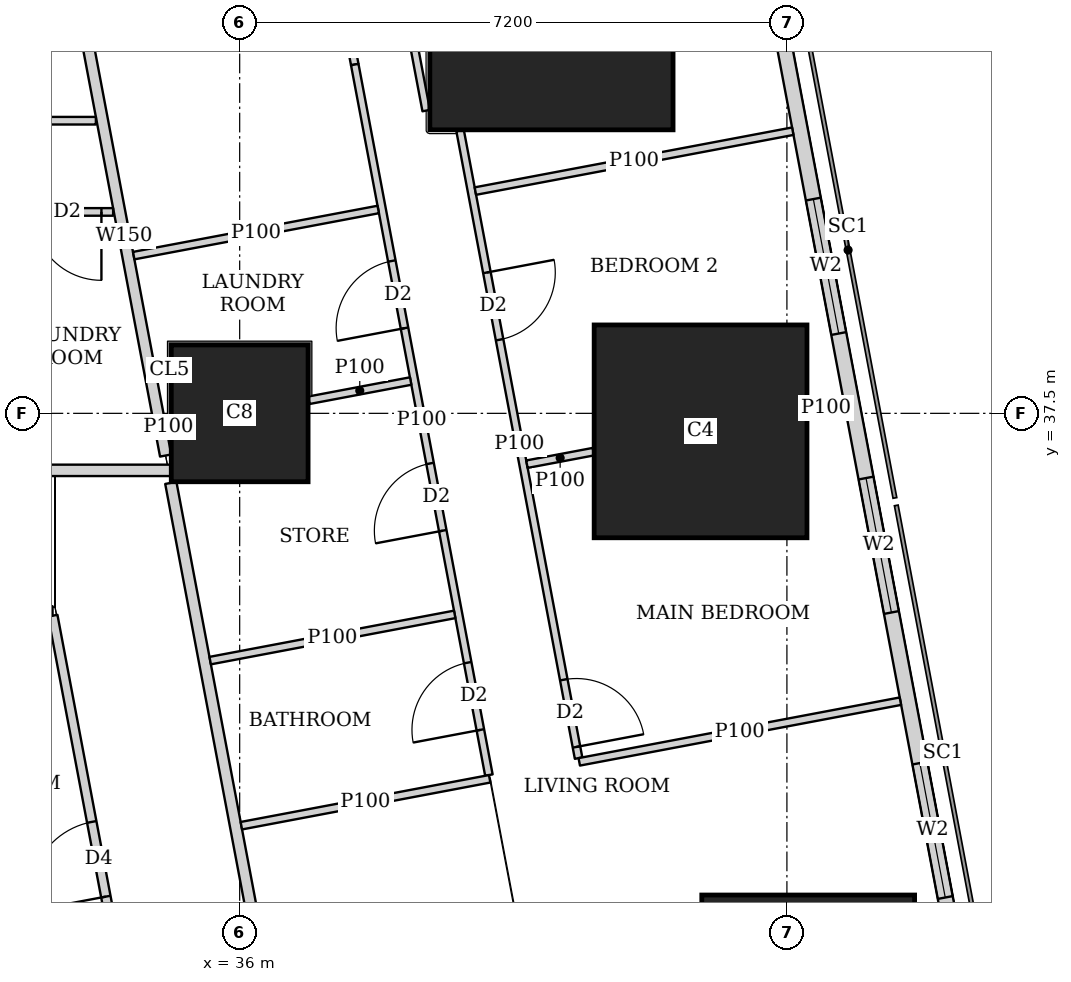
"""IFC4 building model, lengths in metres.
Left out: names, types, materials, properties, quantities, classifications, styles, units other than length and angle.
Written with IfcOpenShell. Run it as: python <this file> out.ifc"""

import sys

from ifc_helpers import new_model, si_unit, direction, frame, frame_2d, origin, origin_2d, place, context, subcontext, project, spatial, rectangle, extrude, element, fill, save


model = new_model("IFC4")
c1 = context("Model", 3, precision=1e-05, world=origin(), true_north=direction((0.0, 1.0)))
c2 = subcontext(c1, "Body", "Model", "MODEL_VIEW")
j1 = project(units=[si_unit("LENGTHUNIT", "METRE"), si_unit("PLANEANGLEUNIT", "RADIAN")], contexts=[c1])
p1 = place(None, origin())
s1 = spatial("IfcSite", under=j1, at=p1, CompositionType="ELEMENT")
p2 = place(p1, origin())
s2 = spatial("IfcBuilding", under=s1, at=p2, CompositionType="ELEMENT")
p3 = place(p2, frame((0.0, 0.0, 31.25)))
s3 = spatial("IfcBuildingStorey", under=s2, at=p3, CompositionType="ELEMENT", Elevation=31.25)
p4 = place(p3, frame((43.48, 29.763, 0.0), z_axis=(0.0, 0.0, 1.0), x_axis=(1.0, 0.0, 0.0)))
e1 = element("IfcColumn", 1, at=p4, inside=s3, PredefinedType="COLUMN", context=c2, shape_type="SweptSolid", body=[
    extrude(rectangle(XDim=2.8, YDim=2.8, at=origin_2d()), origin(), (0.0, 0.0, 1.0), 3.75),
])
p5 = place(p3, frame((36.0, 37.5, 0.0), z_axis=(0.0, 0.0, 1.0), x_axis=(1.0, 0.0, 0.0)))
e2 = element("IfcColumn", 2, at=p5, inside=s3, PredefinedType="COLUMN", context=c2, shape_type="SweptSolid", body=[
    extrude(rectangle(XDim=1.8, YDim=1.8, at=origin_2d()), origin(), (0.0, 0.0, 1.0), 3.75),
])
p6 = place(p3, frame((42.064, 37.263, 0.0), z_axis=(0.0, 0.0, 1.0), x_axis=(1.0, 0.0, 0.0)))
e3 = element("IfcColumn", 3, at=p6, inside=s3, PredefinedType="COLUMN", context=c2, shape_type="SweptSolid", body=[
    extrude(rectangle(XDim=2.8, YDim=2.8, at=origin_2d()), origin(), (0.0, 0.0, 1.0), 3.75),
])
p7 = place(p3, frame((40.102, 42.83, 0.0), z_axis=(0.0, 0.0, 1.0), x_axis=(1.0, 0.0, 0.0)))
e4 = element("IfcColumn", 4, at=p7, inside=s3, PredefinedType="COLUMN", context=c2, shape_type="SweptSolid", body=[
    extrude(rectangle(XDim=3.2, YDim=3.2, at=origin_2d()), origin(), (0.0, 0.0, 1.0), 3.75),
])
p8 = place(p3, frame((50.653, 2.703, 0.0), z_axis=(0.0, 0.0, 1.0), x_axis=(-0.185612026696, 0.982623109613, 0.0)))
e5 = element("IfcWall", 5, at=p8, inside=s3, PredefinedType="SOLIDWALL", context=c2, shape_type="SweptSolid", body=[
    extrude(rectangle(XDim=41.393, YDim=0.2, at=frame_2d((20.697, 0.0))), origin(), (0.0, 0.0, 1.0), 3.5),
])
p9 = place(p8, frame((1.633, 0.0, 0.9)))
e6 = element("IfcOpeningElement", 6, at=p9, cuts=e5, PredefinedType="OPENING", context=c2, shape_type="SweptSolid", body=[
    extrude(rectangle(XDim=1.8, YDim=1.5, at=frame_2d((0.9, 0.75))), frame((0.0, 0.11, 0.0), z_axis=(0.0, -1.0, 0.0), x_axis=(1.0, 0.0, 0.0)), (0.0, 0.0, 1.0), 0.22),
])
p10 = place(p8, frame((6.032, 0.0, 0.9)))
e7 = element("IfcOpeningElement", 7, at=p10, cuts=e5, PredefinedType="OPENING", context=c2, shape_type="SweptSolid", body=[
    extrude(rectangle(XDim=1.8, YDim=1.5, at=frame_2d((0.9, 0.75))), frame((0.0, 0.11, 0.0), z_axis=(0.0, -1.0, 0.0), x_axis=(1.0, 0.0, 0.0)), (0.0, 0.0, 1.0), 0.22),
])
p11 = place(p8, frame((9.848, 0.0, 0.9)))
e8 = element("IfcOpeningElement", 8, at=p11, cuts=e5, PredefinedType="OPENING", context=c2, shape_type="SweptSolid", body=[
    extrude(rectangle(XDim=1.8, YDim=1.5, at=frame_2d((0.9, 0.75))), frame((0.0, 0.11, 0.0), z_axis=(0.0, -1.0, 0.0), x_axis=(1.0, 0.0, 0.0)), (0.0, 0.0, 1.0), 0.22),
])
p12 = place(p8, frame((17.481, 0.0, 0.9)))
e9 = element("IfcOpeningElement", 9, at=p12, cuts=e5, PredefinedType="OPENING", context=c2, shape_type="SweptSolid", body=[
    extrude(rectangle(XDim=1.8, YDim=1.5, at=frame_2d((0.9, 0.75))), frame((0.0, 0.11, 0.0), z_axis=(0.0, -1.0, 0.0), x_axis=(1.0, 0.0, 0.0)), (0.0, 0.0, 1.0), 0.22),
])
p13 = place(p8, frame((21.297, 0.0, 0.9)))
e10 = element("IfcOpeningElement", 10, at=p13, cuts=e5, PredefinedType="OPENING", context=c2, shape_type="SweptSolid", body=[
    extrude(rectangle(XDim=1.8, YDim=1.5, at=frame_2d((0.9, 0.75))), frame((0.0, 0.11, 0.0), z_axis=(0.0, -1.0, 0.0), x_axis=(1.0, 0.0, 0.0)), (0.0, 0.0, 1.0), 0.22),
])
p14 = place(p8, frame((25.113, 0.0, 0.9)))
e11 = element("IfcOpeningElement", 11, at=p14, cuts=e5, PredefinedType="OPENING", context=c2, shape_type="SweptSolid", body=[
    extrude(rectangle(XDim=1.8, YDim=1.5, at=frame_2d((0.9, 0.75))), frame((0.0, 0.11, 0.0), z_axis=(0.0, -1.0, 0.0), x_axis=(1.0, 0.0, 0.0)), (0.0, 0.0, 1.0), 0.22),
])
p15 = place(p8, frame((28.93, 0.0, 0.9)))
e12 = element("IfcOpeningElement", 12, at=p15, cuts=e5, PredefinedType="OPENING", context=c2, shape_type="SweptSolid", body=[
    extrude(rectangle(XDim=1.8, YDim=1.5, at=frame_2d((0.9, 0.75))), frame((0.0, 0.11, 0.0), z_axis=(0.0, -1.0, 0.0), x_axis=(1.0, 0.0, 0.0)), (0.0, 0.0, 1.0), 0.22),
])
p16 = place(p8, frame((32.746, 0.0, 0.9)))
e13 = element("IfcOpeningElement", 13, at=p16, cuts=e5, PredefinedType="OPENING", context=c2, shape_type="SweptSolid", body=[
    extrude(rectangle(XDim=1.8, YDim=1.5, at=frame_2d((0.9, 0.75))), frame((0.0, 0.11, 0.0), z_axis=(0.0, -1.0, 0.0), x_axis=(1.0, 0.0, 0.0)), (0.0, 0.0, 1.0), 0.22),
])
p17 = place(p8, frame((36.481, 0.0, 0.9)))
e14 = element("IfcOpeningElement", 14, at=p17, cuts=e5, PredefinedType="OPENING", context=c2, shape_type="SweptSolid", body=[
    extrude(rectangle(XDim=1.8, YDim=1.5, at=frame_2d((0.9, 0.75))), frame((0.0, 0.11, 0.0), z_axis=(0.0, -1.0, 0.0), x_axis=(1.0, 0.0, 0.0)), (0.0, 0.0, 1.0), 0.22),
])
p18 = place(p3, frame((29.701, 36.75, 0.0), z_axis=(0.0, 0.0, 1.0), x_axis=(1.0, 0.0, 0.0)))
e15 = element("IfcWall", 15, at=p18, inside=s3, PredefinedType="SOLIDWALL", context=c2, shape_type="SweptSolid", body=[
    extrude(rectangle(XDim=5.399, YDim=0.15, at=frame_2d((2.7, 0.0))), origin(), (0.0, 0.0, 1.0), 3.5),
])
p19 = place(p3, frame((33.933, 42.73, 0.0), z_axis=(0.0, 0.0, 1.0), x_axis=(0.185617897238, -0.982622000682, 0.0)))
e16 = element("IfcWall", 16, at=p19, inside=s3, PredefinedType="SOLIDWALL", context=c2, shape_type="SweptSolid", body=[
    extrude(rectangle(XDim=5.887, YDim=0.15, at=frame_2d((2.944, 0.0))), origin(), (0.0, 0.0, 1.0), 3.5),
])
p20 = place(p3, frame((35.094, 36.585, 0.0), z_axis=(0.0, 0.0, 1.0), x_axis=(0.185588860311, -0.982627485331, 0.0)))
e17 = element("IfcWall", 17, at=p20, inside=s3, PredefinedType="SOLIDWALL", context=c2, shape_type="SweptSolid", body=[
    extrude(rectangle(XDim=34.797, YDim=0.15, at=frame_2d((17.399, 0.0))), origin(), (0.0, 0.0, 1.0), 2.5),
])
p21 = place(p20, frame((6.012, 0.0, 0.0)))
e18 = element("IfcOpeningElement", 18, at=p21, cuts=e17, PredefinedType="OPENING", context=c2, shape_type="SweptSolid", body=[
    extrude(rectangle(XDim=1.0, YDim=2.1, at=frame_2d((0.5, 1.05))), frame((0.0, 0.085, 0.0), z_axis=(0.0, -1.0, 0.0), x_axis=(1.0, 0.0, 0.0)), (0.0, 0.0, 1.0), 0.17),
])
p22 = place(p20, frame((9.828, 0.0, 0.0)))
e19 = element("IfcOpeningElement", 19, at=p22, cuts=e17, PredefinedType="OPENING", context=c2, shape_type="SweptSolid", body=[
    extrude(rectangle(XDim=1.0, YDim=2.1, at=frame_2d((0.5, 1.05))), frame((0.0, 0.085, 0.0), z_axis=(0.0, -1.0, 0.0), x_axis=(1.0, 0.0, 0.0)), (0.0, 0.0, 1.0), 0.17),
])
p23 = place(p20, frame((25.9, 0.0, 0.0)))
e20 = element("IfcOpeningElement", 20, at=p23, cuts=e17, PredefinedType="OPENING", context=c2, shape_type="SweptSolid", body=[
    extrude(rectangle(XDim=1.0, YDim=2.1, at=frame_2d((0.5, 1.05))), frame((0.0, 0.085, 0.0), z_axis=(0.0, -1.0, 0.0), x_axis=(1.0, 0.0, 0.0)), (0.0, 0.0, 1.0), 0.17),
])
p24 = place(p3, frame((38.454, 41.483, 0.0), z_axis=(0.0, 0.0, 1.0), x_axis=(-0.185609245326, 0.982623634994, 0.0)))
e21 = element("IfcWall", 21, at=p24, inside=s3, PredefinedType="PARTITIONING", context=c2, shape_type="SweptSolid", body=[
    extrude(rectangle(XDim=4.241, YDim=0.1, at=frame_2d((2.12, 0.0))), origin(), (0.0, 0.0, 1.0), 2.05),
])
p25 = place(p3, frame((38.9, 41.22, 0.0), z_axis=(0.0, 0.0, 1.0), x_axis=(0.18556562412, -0.982631873666, 0.0)))
e22 = element("IfcWall", 22, at=p25, inside=s3, PredefinedType="PARTITIONING", context=c2, shape_type="SweptSolid", body=[
    extrude(rectangle(XDim=8.402, YDim=0.1, at=frame_2d((4.201, 0.0))), origin(), (0.0, 0.0, 1.0), 3.5),
])
p26 = place(p25, frame((7.352, 0.0, 0.0)))
e23 = element("IfcOpeningElement", 23, at=p26, cuts=e22, PredefinedType="OPENING", context=c2, shape_type="SweptSolid", body=[
    extrude(rectangle(XDim=0.9, YDim=2.1, at=frame_2d((0.45, 1.05))), frame((0.0, 0.06, 0.0), z_axis=(0.0, -1.0, 0.0), x_axis=(1.0, 0.0, 0.0)), (0.0, 0.0, 1.0), 0.12),
])
p27 = place(p25, frame((1.9, 0.0, 0.0)))
e24 = element("IfcOpeningElement", 24, at=p27, cuts=e22, PredefinedType="OPENING", context=c2, shape_type="SweptSolid", body=[
    extrude(rectangle(XDim=0.9, YDim=2.1, at=frame_2d((0.45, 1.05))), frame((0.0, 0.06, 0.0), z_axis=(0.0, -1.0, 0.0), x_axis=(1.0, 0.0, 0.0)), (0.0, 0.0, 1.0), 0.12),
])
p28 = place(p3, frame((37.417, 42.602, 0.0), z_axis=(0.0, 0.0, 1.0), x_axis=(0.185672001976, -0.982611778721, 0.0)))
e25 = element("IfcWall", 25, at=p28, inside=s3, PredefinedType="PARTITIONING", context=c2, shape_type="SweptSolid", body=[
    extrude(rectangle(XDim=0.522, YDim=0.1, at=frame_2d((0.261, 0.0))), origin(), (0.0, 0.0, 1.0), 2.05),
])
p29 = place(p3, frame((37.514, 42.089, 0.0), z_axis=(0.0, 0.0, 1.0), x_axis=(0.185543450498, -0.982636060796, 0.0)))
e26 = element("IfcWall", 26, at=p29, inside=s3, PredefinedType="PARTITIONING", context=c2, shape_type="SweptSolid", body=[
    extrude(rectangle(XDim=9.513, YDim=0.1, at=frame_2d((4.757, 0.0))), origin(), (0.0, 0.0, 1.0), 3.5),
])
p30 = place(p29, frame((8.008, 0.0, 0.0)))
e27 = element("IfcOpeningElement", 27, at=p30, cuts=e26, PredefinedType="OPENING", context=c2, shape_type="SweptSolid", body=[
    extrude(rectangle(XDim=0.9, YDim=2.1, at=frame_2d((0.45, 1.05))), frame((0.0, 0.06, 0.0), z_axis=(0.0, -1.0, 0.0), x_axis=(1.0, 0.0, 0.0)), (0.0, 0.0, 1.0), 0.12),
])
p31 = place(p29, frame((2.63, 0.0, 0.0)))
e28 = element("IfcOpeningElement", 28, at=p31, cuts=e26, PredefinedType="OPENING", context=c2, shape_type="SweptSolid", body=[
    extrude(rectangle(XDim=0.9, YDim=2.1, at=frame_2d((0.45, 1.05))), frame((0.0, 0.06, 0.0), z_axis=(0.0, -1.0, 0.0), x_axis=(1.0, 0.0, 0.0)), (0.0, 0.0, 1.0), 0.12),
])
p32 = place(p29, frame((5.341, 0.0, 0.0)))
e29 = element("IfcOpeningElement", 29, at=p32, cuts=e26, PredefinedType="OPENING", context=c2, shape_type="SweptSolid", body=[
    extrude(rectangle(XDim=0.9, YDim=2.1, at=frame_2d((0.45, 1.05))), frame((0.0, 0.06, 0.0), z_axis=(0.0, -1.0, 0.0), x_axis=(1.0, 0.0, 0.0)), (0.0, 0.0, 1.0), 0.12),
])
p33 = place(p3, frame((43.277, 41.212, 0.0), z_axis=(0.0, 0.0, 1.0), x_axis=(-0.982665405803, -0.185387972203, 0.0)))
e30 = element("IfcWall", 30, at=p33, inside=s3, PredefinedType="PARTITIONING", context=c2, shape_type="SweptSolid", body=[
    extrude(rectangle(XDim=4.25, YDim=0.1, at=frame_2d((2.125, 0.0))), origin(), (0.0, 0.0, 1.0), 2.05),
])
p34 = place(p3, frame((43.955, 37.62, 0.0), z_axis=(0.0, 0.0, 1.0), x_axis=(-0.982543152073, -0.186034820164, 0.0)))
e31 = element("IfcWall", 31, at=p34, inside=s3, PredefinedType="PARTITIONING", context=c2, shape_type="SweptSolid", body=[
    extrude(rectangle(XDim=0.49, YDim=0.1, at=frame_2d((0.245, 0.0))), origin(), (0.0, 0.0, 1.0), 3.5),
])
p35 = place(p3, frame((40.654, 36.996, 0.0), z_axis=(0.0, 0.0, 1.0), x_axis=(-0.982672962335, -0.185347913655, 0.0)))
e32 = element("IfcWall", 32, at=p35, inside=s3, PredefinedType="PARTITIONING", context=c2, shape_type="SweptSolid", body=[
    extrude(rectangle(XDim=0.89, YDim=0.1, at=frame_2d((0.445, 0.0))), origin(), (0.0, 0.0, 1.0), 3.5),
])
p36 = place(p3, frame((44.693, 33.713, 0.0), z_axis=(0.0, 0.0, 1.0), x_axis=(-0.982633535512, -0.185556823879, 0.0)))
e33 = element("IfcWall", 33, at=p36, inside=s3, PredefinedType="PARTITIONING", context=c2, shape_type="SweptSolid", body=[
    extrude(rectangle(XDim=4.3, YDim=0.1, at=frame_2d((2.15, 0.0))), origin(), (0.0, 0.0, 1.0), 2.05),
])
p37 = place(p3, frame((37.823, 40.182, 0.0), z_axis=(0.0, 0.0, 1.0), x_axis=(-0.982664729897, -0.18539155487, 0.0)))
e34 = element("IfcWall", 34, at=p37, inside=s3, PredefinedType="PARTITIONING", context=c2, shape_type="SweptSolid", body=[
    extrude(rectangle(XDim=3.274, YDim=0.1, at=frame_2d((1.637, 0.0))), origin(), (0.0, 0.0, 1.0), 3.5),
])
p38 = place(p3, frame((38.25, 37.925, 0.0), z_axis=(0.0, 0.0, 1.0), x_axis=(-0.982650574676, -0.185466568658, 0.0)))
e35 = element("IfcWall", 35, at=p38, inside=s3, PredefinedType="PARTITIONING", context=c2, shape_type="SweptSolid", body=[
    extrude(rectangle(XDim=1.364, YDim=0.1, at=frame_2d((0.682, 0.0))), origin(), (0.0, 0.0, 1.0), 3.5),
])
p39 = place(p3, frame((35.09, 37.328, 0.0), z_axis=(0.0, 0.0, 1.0), x_axis=(-0.982590620415, -0.185783940835, 0.0)))
e36 = element("IfcWall", 36, at=p39, inside=s3, PredefinedType="PARTITIONING", context=c2, shape_type="SweptSolid", body=[
    extrude(rectangle(XDim=0.059, YDim=0.1, at=frame_2d((0.03, 0.0))), origin(), (0.0, 0.0, 1.0), 3.5),
])
p40 = place(p3, frame((39.289, 32.692, 0.0), z_axis=(0.0, 0.0, 1.0), x_axis=(-0.982633623707, -0.185556356831, 0.0)))
e37 = element("IfcWall", 37, at=p40, inside=s3, PredefinedType="PARTITIONING", context=c2, shape_type="SweptSolid", body=[
    extrude(rectangle(XDim=3.325, YDim=0.1, at=frame_2d((1.663, 0.0))), origin(), (0.0, 0.0, 1.0), 3.5),
])
p41 = place(p3, frame((38.829, 34.855, 0.0), z_axis=(0.0, 0.0, 1.0), x_axis=(-0.982610347627, -0.185679575441, 0.0)))
e38 = element("IfcWall", 38, at=p41, inside=s3, PredefinedType="PARTITIONING", context=c2, shape_type="SweptSolid", body=[
    extrude(rectangle(XDim=3.274, YDim=0.1, at=frame_2d((1.637, 0.0))), origin(), (0.0, 0.0, 1.0), 3.5),
])
p42 = place(p3, frame((28.8, 41.35, 0.0), z_axis=(0.0, 0.0, 1.0), x_axis=(1.0, 0.0, 0.0)))
e39 = element("IfcWall", 39, at=p42, inside=s3, PredefinedType="PARTITIONING", context=c2, shape_type="SweptSolid", body=[
    extrude(rectangle(XDim=5.308, YDim=0.1, at=frame_2d((2.654, 0.0))), origin(), (0.0, 0.0, 1.0), 3.5),
])
p43 = place(p42, frame((1.45, 0.0, 0.0)))
e40 = element("IfcOpeningElement", 40, at=p43, cuts=e39, PredefinedType="OPENING", context=c2, shape_type="SweptSolid", body=[
    extrude(rectangle(XDim=0.9, YDim=2.1, at=frame_2d((0.45, 1.05))), frame((0.0, 0.06, 0.0), z_axis=(0.0, -1.0, 0.0), x_axis=(1.0, 0.0, 0.0)), (0.0, 0.0, 1.0), 0.12),
])
p44 = place(p3, frame((28.8, 40.15, 0.0), z_axis=(0.0, 0.0, 1.0), x_axis=(1.0, 0.0, 0.0)))
e41 = element("IfcWall", 41, at=p44, inside=s3, PredefinedType="PARTITIONING", context=c2, shape_type="SweptSolid", body=[
    extrude(rectangle(XDim=5.535, YDim=0.1, at=frame_2d((2.768, 0.0))), origin(), (0.0, 0.0, 1.0), 3.5),
])
p45 = place(p44, frame((0.655, 0.0, 0.0)))
e42 = element("IfcOpeningElement", 42, at=p45, cuts=e41, PredefinedType="OPENING", context=c2, shape_type="SweptSolid", body=[
    extrude(rectangle(XDim=0.9, YDim=2.1, at=frame_2d((0.45, 1.05))), frame((0.0, 0.06, 0.0), z_axis=(0.0, -1.0, 0.0), x_axis=(1.0, 0.0, 0.0)), (0.0, 0.0, 1.0), 0.12),
])
p46 = place(p44, frame((4.481, 0.0, 0.0)))
e43 = element("IfcOpeningElement", 43, at=p46, cuts=e41, PredefinedType="OPENING", context=c2, shape_type="SweptSolid", body=[
    extrude(rectangle(XDim=0.9, YDim=2.1, at=frame_2d((0.45, 1.05))), frame((0.0, 0.06, 0.0), z_axis=(0.0, -1.0, 0.0), x_axis=(1.0, 0.0, 0.0)), (0.0, 0.0, 1.0), 0.12),
])
p47 = place(p44, frame((2.455, 0.0, 0.0)))
e44 = element("IfcOpeningElement", 44, at=p47, cuts=e41, PredefinedType="OPENING", context=c2, shape_type="SweptSolid", body=[
    extrude(rectangle(XDim=0.9, YDim=2.1, at=frame_2d((0.45, 1.05))), frame((0.0, 0.06, 0.0), z_axis=(0.0, -1.0, 0.0), x_axis=(1.0, 0.0, 0.0)), (0.0, 0.0, 1.0), 0.12),
])
p48 = place(p3, frame((28.95, 34.9, 0.0), z_axis=(0.0, 0.0, 1.0), x_axis=(1.0, 0.0, 0.0)))
e45 = element("IfcWall", 45, at=p48, inside=s3, PredefinedType="PARTITIONING", context=c2, shape_type="SweptSolid", body=[
    extrude(rectangle(XDim=4.588, YDim=0.125, at=frame_2d((2.294, 0.0))), origin(), (0.0, 0.0, 1.0), 3.5),
])
p49 = place(p3, frame((38.202, 10.163, 0.0), z_axis=(0.0, 0.0, 1.0), x_axis=(-0.185610321132, 0.982623431783, 0.0)))
e46 = element("IfcWall", 46, at=p49, inside=s3, PredefinedType="PARTITIONING", context=c2, shape_type="SweptSolid", body=[
    extrude(rectangle(XDim=25.111, YDim=0.125, at=frame_2d((12.556, 0.0))), origin(), (0.0, 0.0, 1.0), 2.5),
])
p50 = place(p49, frame((0.708, 0.0, 0.0)))
e47 = element("IfcOpeningElement", 47, at=p50, cuts=e46, PredefinedType="OPENING", context=c2, shape_type="SweptSolid", body=[
    extrude(rectangle(XDim=1.0, YDim=2.1, at=frame_2d((0.5, 1.05))), frame((0.0, 0.073, 0.0), z_axis=(0.0, -1.0, 0.0), x_axis=(1.0, 0.0, 0.0)), (0.0, 0.0, 1.0), 0.145),
])
p51 = place(p49, frame((6.1, 0.0, 0.0)))
e48 = element("IfcOpeningElement", 48, at=p51, cuts=e46, PredefinedType="OPENING", context=c2, shape_type="SweptSolid", body=[
    extrude(rectangle(XDim=1.0, YDim=2.1, at=frame_2d((0.5, 1.05))), frame((0.0, 0.073, 0.0), z_axis=(0.0, -1.0, 0.0), x_axis=(1.0, 0.0, 0.0)), (0.0, 0.0, 1.0), 0.145),
])
p52 = place(p49, frame((13.378, 0.0, 0.0)))
e49 = element("IfcOpeningElement", 49, at=p52, cuts=e46, PredefinedType="OPENING", context=c2, shape_type="SweptSolid", body=[
    extrude(rectangle(XDim=1.0, YDim=2.1, at=frame_2d((0.5, 1.05))), frame((0.0, 0.073, 0.0), z_axis=(0.0, -1.0, 0.0), x_axis=(1.0, 0.0, 0.0)), (0.0, 0.0, 1.0), 0.145),
])
p53 = place(p49, frame((17.194, 0.0, 0.0)))
e50 = element("IfcOpeningElement", 50, at=p53, cuts=e46, PredefinedType="OPENING", context=c2, shape_type="SweptSolid", body=[
    extrude(rectangle(XDim=1.0, YDim=2.1, at=frame_2d((0.5, 1.05))), frame((0.0, 0.073, 0.0), z_axis=(0.0, -1.0, 0.0), x_axis=(1.0, 0.0, 0.0)), (0.0, 0.0, 1.0), 0.145),
])
p54 = place(p49, frame((21.35, 0.0, 0.0)))
e51 = element("IfcOpeningElement", 51, at=p54, cuts=e46, PredefinedType="OPENING", context=c2, shape_type="SweptSolid", body=[
    extrude(rectangle(XDim=1.0, YDim=2.1, at=frame_2d((0.5, 1.05))), frame((0.0, 0.073, 0.0), z_axis=(0.0, -1.0, 0.0), x_axis=(1.0, 0.0, 0.0)), (0.0, 0.0, 1.0), 0.145),
])
p55 = place(p15, origin())
e52 = element("IfcWindow", 52, at=p55, inside=s3, PartitioningType="SINGLE_PANEL", PredefinedType="WINDOW", context=c2, shape_type="SweptSolid", body=[
    extrude(rectangle(XDim=1.8, YDim=1.5, at=frame_2d((0.9, 0.75))), frame((0.0, 0.03, 0.0), z_axis=(0.0, -1.0, 0.0), x_axis=(1.0, 0.0, 0.0)), (0.0, 0.0, 1.0), 0.06),
])
fill(e12, e52)
p56 = place(p16, origin())
e53 = element("IfcWindow", 53, at=p56, inside=s3, PartitioningType="SINGLE_PANEL", PredefinedType="WINDOW", context=c2, shape_type="SweptSolid", body=[
    extrude(rectangle(XDim=1.8, YDim=1.5, at=frame_2d((0.9, 0.75))), frame((0.0, 0.03, 0.0), z_axis=(0.0, -1.0, 0.0), x_axis=(1.0, 0.0, 0.0)), (0.0, 0.0, 1.0), 0.06),
])
fill(e13, e53)
p57 = place(p17, origin())
e54 = element("IfcWindow", 54, at=p57, inside=s3, PartitioningType="SINGLE_PANEL", PredefinedType="WINDOW", context=c2, shape_type="SweptSolid", body=[
    extrude(rectangle(XDim=1.8, YDim=1.5, at=frame_2d((0.9, 0.75))), frame((0.0, 0.03, 0.0), z_axis=(0.0, -1.0, 0.0), x_axis=(1.0, 0.0, 0.0)), (0.0, 0.0, 1.0), 0.06),
])
fill(e14, e54)
p58 = place(p26, origin())
e55 = element("IfcDoor", 55, at=p58, inside=s3, OperationType="SINGLE_SWING_RIGHT", PredefinedType="DOOR", context=c2, shape_type="SweptSolid", body=[
    extrude(rectangle(XDim=0.9, YDim=2.1, at=frame_2d((0.45, 1.05))), frame((0.0, 0.025, 0.0), z_axis=(0.0, -1.0, 0.0), x_axis=(1.0, 0.0, 0.0)), (0.0, 0.0, 1.0), 0.05),
])
fill(e23, e55)
p59 = place(p27, origin())
e56 = element("IfcDoor", 56, at=p59, inside=s3, OperationType="SINGLE_SWING_LEFT", PredefinedType="DOOR", context=c2, shape_type="SweptSolid", body=[
    extrude(rectangle(XDim=0.9, YDim=2.1, at=frame_2d((0.45, 1.05))), frame((0.0, 0.025, 0.0), z_axis=(0.0, -1.0, 0.0), x_axis=(1.0, 0.0, 0.0)), (0.0, 0.0, 1.0), 0.05),
])
fill(e24, e56)
p60 = place(p30, origin())
e57 = element("IfcDoor", 57, at=p60, inside=s3, OperationType="SINGLE_SWING_LEFT", PredefinedType="DOOR", context=c2, shape_type="SweptSolid", body=[
    extrude(rectangle(XDim=0.9, YDim=2.1, at=frame_2d((0.45, 1.05))), frame((0.0, 0.025, 0.0), z_axis=(0.0, -1.0, 0.0), x_axis=(1.0, 0.0, 0.0)), (0.0, 0.0, 1.0), 0.05),
])
fill(e27, e57)
p61 = place(p31, origin())
e58 = element("IfcDoor", 58, at=p61, inside=s3, OperationType="SINGLE_SWING_LEFT", PredefinedType="DOOR", context=c2, shape_type="SweptSolid", body=[
    extrude(rectangle(XDim=0.9, YDim=2.1, at=frame_2d((0.45, 1.05))), frame((0.0, 0.025, 0.0), z_axis=(0.0, -1.0, 0.0), x_axis=(1.0, 0.0, 0.0)), (0.0, 0.0, 1.0), 0.05),
])
fill(e28, e58)
p62 = place(p32, origin())
e59 = element("IfcDoor", 59, at=p62, inside=s3, OperationType="SINGLE_SWING_LEFT", PredefinedType="DOOR", context=c2, shape_type="SweptSolid", body=[
    extrude(rectangle(XDim=0.9, YDim=2.1, at=frame_2d((0.45, 1.05))), frame((0.0, 0.025, 0.0), z_axis=(0.0, -1.0, 0.0), x_axis=(1.0, 0.0, 0.0)), (0.0, 0.0, 1.0), 0.05),
])
fill(e29, e59)
p63 = place(p46, origin())
e60 = element("IfcDoor", 60, at=p63, inside=s3, OperationType="SINGLE_SWING_LEFT", PredefinedType="DOOR", context=c2, shape_type="SweptSolid", body=[
    extrude(rectangle(XDim=0.9, YDim=2.1, at=frame_2d((0.45, 1.05))), frame((0.0, 0.025, 0.0), z_axis=(0.0, -1.0, 0.0), x_axis=(1.0, 0.0, 0.0)), (0.0, 0.0, 1.0), 0.05),
])
fill(e43, e60)
p64 = place(p54, origin())
e61 = element("IfcDoor", 61, at=p64, inside=s3, OperationType="SINGLE_SWING_LEFT", PredefinedType="DOOR", context=c2, shape_type="SweptSolid", body=[
    extrude(rectangle(XDim=1.0, YDim=2.1, at=frame_2d((0.5, 1.05))), frame((0.0, 0.025, 0.0), z_axis=(0.0, -1.0, 0.0), x_axis=(1.0, 0.0, 0.0)), (0.0, 0.0, 1.0), 0.05),
])
fill(e51, e61)
save(model, sys.argv[1])
